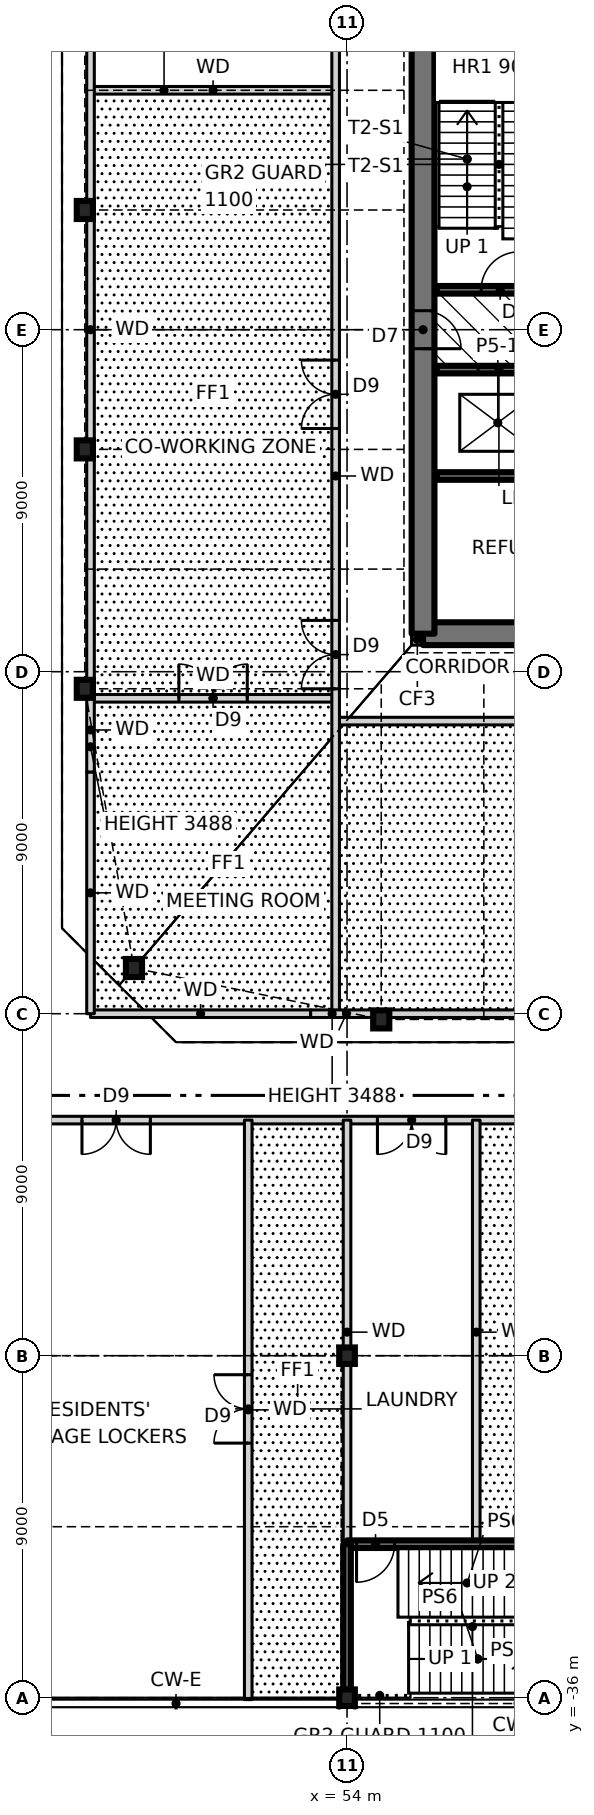
"""IFC4 building model, lengths in metres.
Left out: names, types, materials, properties, quantities, classifications, styles, units other than length and angle.
Written with IfcOpenShell. Run it as: python <this file> out.ifc"""

import sys

from ifc_helpers import new_model, si_unit, direction, frame, frame_2d, origin, origin_2d, place, context, subcontext, project, spatial, rectangle, i_section, extrude, element, fill, save


model = new_model("IFC4")
c1 = context("Model", 3, precision=1e-05, world=origin(), true_north=direction((0.0, 1.0)))
c2 = subcontext(c1, "Body", "Model", "MODEL_VIEW")
j1 = project(units=[si_unit("LENGTHUNIT", "METRE"), si_unit("PLANEANGLEUNIT", "RADIAN")], contexts=[c1])
p1 = place(None, origin())
s1 = spatial("IfcSite", under=j1, at=p1, CompositionType="ELEMENT")
p2 = place(p1, origin())
s2 = spatial("IfcBuilding", under=s1, at=p2, CompositionType="ELEMENT")
p3 = place(p2, frame((0.0, 0.0, 6.0)))
s3 = spatial("IfcBuildingStorey", under=s2, at=p3, CompositionType="ELEMENT", Elevation=6.0)
for number, where, z_axis, x_axis in (
    (1, (48.394, -16.797, 0.0), (0.0, 0.0, 1.0), (1.0, 0.0, 0.0)),
    (2, (54.9, -18.15, 0.0), (0.0, 0.0, 1.0), (1.0, 0.0, 0.0)),
    (3, (47.1, 3.15, 0.0), (0.0, 0.0, 1.0), (1.0, 0.0, 0.0)),
    (4, (47.1, -3.15, 0.0), (0.0, 0.0, 1.0), (1.0, 0.0, 0.0)),
    (5, (47.1, -9.45, 0.0), (0.0, 0.0, 1.0), (1.0, 0.0, 0.0)),
):
    element("IfcColumn", number, at=place(p3, frame(where, z_axis=z_axis, x_axis=x_axis)), inside=s3, PredefinedType="COLUMN", context=c2, shape_type="SweptSolid", body=[
        extrude(i_section(OverallWidth=0.424, OverallDepth=0.475, WebThickness=0.048, FlangeThickness=0.077, at=origin_2d()), origin(), (0.0, 0.0, 1.0), 4.5),
    ])
for number, where, z_axis, x_axis in (
    (6, (54.0, -36.0, 0.0), (0.0, 0.0, 1.0), (1.0, 0.0, 0.0)),
    (7, (54.0, -27.0, 0.0), (0.0, 0.0, 1.0), (1.0, 0.0, 0.0)),
):
    element("IfcColumn", number, at=place(p3, frame(where, z_axis=z_axis, x_axis=x_axis)), inside=s3, PredefinedType="COLUMN", context=c2, shape_type="SweptSolid", body=[
        extrude(i_section(OverallWidth=0.411, OverallDepth=0.434, WebThickness=0.036, FlangeThickness=0.057, at=origin_2d()), origin(), (0.0, 0.0, 1.0), 4.5),
    ])
p4 = place(p3, frame((55.7, -8.15, 0.0), z_axis=(0.0, 0.0, 1.0), x_axis=(1.0, 0.0, 0.0)))
e8 = element("IfcWall", 8, at=p4, inside=s3, PredefinedType="SOLIDWALL", context=c2, shape_type="SweptSolid", body=[
    extrude(rectangle(XDim=0.3, YDim=0.3, at=frame_2d((0.15, 0.0))), origin(), (0.0, 0.0, 1.0), 4.5),
])
p5 = place(p3, frame((56.0, -8.0, 0.0), z_axis=(0.0, 0.0, 1.0), x_axis=(1.0, 0.0, 0.0)))
e9 = element("IfcWall", 9, at=p5, inside=s3, PredefinedType="SHEAR", context=c2, shape_type="SweptSolid", body=[
    extrude(rectangle(XDim=14.0, YDim=0.6, at=frame_2d((7.0, 0.0))), origin(), (0.0, 0.0, 1.0), 4.5),
])
p6 = place(p5, frame((2.7, 0.0, 0.0)))
e10 = element("IfcOpeningElement", 10, at=p6, cuts=e9, PredefinedType="OPENING", context=c2, shape_type="SweptSolid", body=[
    extrude(rectangle(XDim=0.9, YDim=2.1, at=frame_2d((0.45, 1.05))), frame((0.0, 0.31, 0.0), z_axis=(0.0, -1.0, 0.0), x_axis=(1.0, 0.0, 0.0)), (0.0, 0.0, 1.0), 0.62),
])
p7 = place(p5, frame((7.7, 0.0, 0.0)))
e11 = element("IfcOpeningElement", 11, at=p7, cuts=e9, PredefinedType="OPENING", context=c2, shape_type="SweptSolid", body=[
    extrude(rectangle(XDim=0.9, YDim=2.1, at=frame_2d((0.45, 1.05))), frame((0.0, 0.31, 0.0), z_axis=(0.0, -1.0, 0.0), x_axis=(1.0, 0.0, 0.0)), (0.0, 0.0, 1.0), 0.62),
])
p8 = place(p3, frame((56.0, 8.0, 0.0), z_axis=(0.0, 0.0, 1.0), x_axis=(0.0, -1.0, 0.0)))
e12 = element("IfcWall", 12, at=p8, inside=s3, PredefinedType="SHEAR", context=c2, shape_type="SweptSolid", body=[
    extrude(rectangle(XDim=16.0, YDim=0.6, at=frame_2d((8.0, 0.0))), origin(), (0.0, 0.0, 1.0), 4.5),
])
p9 = place(p8, frame((7.5, 0.0, 0.0)))
e13 = element("IfcOpeningElement", 13, at=p9, cuts=e12, PredefinedType="OPENING", context=c2, shape_type="SweptSolid", body=[
    extrude(rectangle(XDim=1.0, YDim=2.1, at=frame_2d((0.5, 1.05))), frame((0.0, 0.31, 0.0), z_axis=(0.0, -1.0, 0.0), x_axis=(1.0, 0.0, 0.0)), (0.0, 0.0, 1.0), 0.62),
])
p10 = place(p3, frame((54.0, -31.96, 0.0), z_axis=(0.0, 0.0, 1.0), x_axis=(1.0, 0.0, 0.0)))
e14 = element("IfcWall", 14, at=p10, inside=s3, PredefinedType="SOLIDWALL", context=c2, shape_type="SweptSolid", body=[
    extrude(rectangle(XDim=9.0, YDim=0.2, at=frame_2d((4.5, 0.0))), origin(), (0.0, 0.0, 1.0), 4.5),
])
p11 = place(p10, frame((0.25, 0.0, 0.0)))
e15 = element("IfcOpeningElement", 15, at=p11, cuts=e14, PredefinedType="OPENING", context=c2, shape_type="SweptSolid", body=[
    extrude(rectangle(XDim=1.0, YDim=2.1, at=frame_2d((0.5, 1.05))), frame((0.0, 0.11, 0.0), z_axis=(0.0, -1.0, 0.0), x_axis=(1.0, 0.0, 0.0)), (0.0, 0.0, 1.0), 0.22),
])
p12 = place(p3, frame((44.45, -20.8, 0.0), z_axis=(0.0, 0.0, 1.0), x_axis=(1.0, 0.0, 0.0)))
e16 = element("IfcWall", 16, at=p12, inside=s3, PredefinedType="SOLIDWALL", context=c2, shape_type="SweptSolid", body=[
    extrude(rectangle(XDim=37.1, YDim=0.2, at=frame_2d((18.55, 0.0))), origin(), (0.0, 0.0, 1.0), 4.25),
])
p13 = place(p12, frame((2.575, 0.0, 0.0)))
e17 = element("IfcOpeningElement", 17, at=p13, cuts=e16, PredefinedType="OPENING", context=c2, shape_type="SweptSolid", body=[
    extrude(rectangle(XDim=1.8, YDim=2.1, at=frame_2d((0.9, 1.05))), frame((0.0, 0.11, 0.0), z_axis=(0.0, -1.0, 0.0), x_axis=(1.0, 0.0, 0.0)), (0.0, 0.0, 1.0), 0.22),
])
p14 = place(p12, frame((24.125, 0.0, 0.0)))
e18 = element("IfcOpeningElement", 18, at=p14, cuts=e16, PredefinedType="OPENING", context=c2, shape_type="SweptSolid", body=[
    extrude(rectangle(XDim=1.8, YDim=2.1, at=frame_2d((0.9, 1.05))), frame((0.0, 0.11, 0.0), z_axis=(0.0, -1.0, 0.0), x_axis=(1.0, 0.0, 0.0)), (0.0, 0.0, 1.0), 0.22),
])
p15 = place(p12, frame((10.35, 0.0, 0.0)))
e19 = element("IfcOpeningElement", 19, at=p15, cuts=e16, PredefinedType="OPENING", context=c2, shape_type="SweptSolid", body=[
    extrude(rectangle(XDim=1.8, YDim=2.1, at=frame_2d((0.9, 1.05))), frame((0.0, 0.11, 0.0), z_axis=(0.0, -1.0, 0.0), x_axis=(1.0, 0.0, 0.0)), (0.0, 0.0, 1.0), 0.22),
])
p16 = place(p3, frame((47.25, -18.0, 0.0), z_axis=(0.0, 0.0, 1.0), x_axis=(1.0, 0.0, 0.0)))
e20 = element("IfcWall", 20, at=p16, inside=s3, PredefinedType="SOLIDWALL", context=c2, shape_type="SweptSolid", body=[
    extrude(rectangle(XDim=5.793, YDim=0.2, at=frame_2d((2.896, 0.0))), origin(), (0.0, 0.0, 1.0), 4.25),
])
p17 = place(p3, frame((53.7, -10.3, 0.0), z_axis=(0.0, 0.0, 1.0), x_axis=(1.0, 0.0, 0.0)))
e21 = element("IfcWall", 21, at=p17, inside=s3, PredefinedType="SOLIDWALL", context=c2, shape_type="SweptSolid", body=[
    extrude(rectangle(XDim=25.05, YDim=0.2, at=frame_2d((12.525, 0.0))), origin(), (0.0, 0.0, 1.0), 4.25),
])
p18 = place(p17, frame((6.6, 0.0, 0.0)))
e22 = element("IfcOpeningElement", 22, at=p18, cuts=e21, PredefinedType="OPENING", context=c2, shape_type="SweptSolid", body=[
    extrude(rectangle(XDim=1.8, YDim=2.1, at=frame_2d((0.9, 1.05))), frame((0.0, 0.11, 0.0), z_axis=(0.0, -1.0, 0.0), x_axis=(1.0, 0.0, 0.0)), (0.0, 0.0, 1.0), 0.22),
])
p19 = place(p17, frame((15.9, 0.0, 0.0)))
e23 = element("IfcOpeningElement", 23, at=p19, cuts=e21, PredefinedType="OPENING", context=c2, shape_type="SweptSolid", body=[
    extrude(rectangle(XDim=1.8, YDim=2.1, at=frame_2d((0.9, 1.05))), frame((0.0, 0.11, 0.0), z_axis=(0.0, -1.0, 0.0), x_axis=(1.0, 0.0, 0.0)), (0.0, 0.0, 1.0), 0.22),
])
p20 = place(p3, frame((47.25, -9.7, 0.0), z_axis=(0.0, 0.0, 1.0), x_axis=(1.0, 0.0, 0.0)))
e24 = element("IfcWall", 24, at=p20, inside=s3, PredefinedType="SOLIDWALL", context=c2, shape_type="SweptSolid", body=[
    extrude(rectangle(XDim=6.45, YDim=0.2, at=frame_2d((3.225, 0.0))), origin(), (0.0, 0.0, 1.0), 4.25),
])
p21 = place(p20, frame((2.325, 0.0, 0.0)))
e25 = element("IfcOpeningElement", 25, at=p21, cuts=e24, PredefinedType="OPENING", context=c2, shape_type="SweptSolid", body=[
    extrude(rectangle(XDim=1.8, YDim=2.1, at=frame_2d((0.9, 1.05))), frame((0.0, 0.11, 0.0), z_axis=(0.0, -1.0, 0.0), x_axis=(1.0, 0.0, 0.0)), (0.0, 0.0, 1.0), 0.22),
])
p22 = place(p3, frame((56.36, -3.85, 0.0), z_axis=(0.0, 0.0, 1.0), x_axis=(1.0, 0.0, 0.0)))
e26 = element("IfcWall", 26, at=p22, inside=s3, PredefinedType="SOLIDWALL", context=c2, shape_type="SweptSolid", body=[
    extrude(rectangle(XDim=9.94, YDim=0.2, at=frame_2d((4.97, 0.0))), origin(), (0.0, 0.0, 1.0), 4.5),
])
p23 = place(p3, frame((56.36, -1.05, 0.0), z_axis=(0.0, 0.0, 1.0), x_axis=(1.0, 0.0, 0.0)))
e27 = element("IfcWall", 27, at=p23, inside=s3, PredefinedType="SOLIDWALL", context=c2, shape_type="SweptSolid", body=[
    extrude(rectangle(XDim=13.28, YDim=0.2, at=frame_2d((6.64, 0.0))), origin(), (0.0, 0.0, 1.0), 4.5),
])
p24 = place(p23, frame((11.11, 0.0, 0.0)))
e28 = element("IfcOpeningElement", 28, at=p24, cuts=e27, PredefinedType="OPENING", context=c2, shape_type="SweptSolid", body=[
    extrude(rectangle(XDim=1.0, YDim=2.1, at=frame_2d((0.5, 1.05))), frame((0.0, 0.11, 0.0), z_axis=(0.0, -1.0, 0.0), x_axis=(1.0, 0.0, 0.0)), (0.0, 0.0, 1.0), 0.22),
])
p25 = place(p23, frame((1.087, 0.0, 0.0)))
e29 = element("IfcOpeningElement", 29, at=p25, cuts=e27, PredefinedType="OPENING", context=c2, shape_type="SweptSolid", body=[
    extrude(rectangle(XDim=1.1, YDim=2.1, at=frame_2d((0.55, 1.05))), frame((0.0, 0.11, 0.0), z_axis=(0.0, -1.0, 0.0), x_axis=(1.0, 0.0, 0.0)), (0.0, 0.0, 1.0), 0.22),
])
p26 = place(p23, frame((4.39, 0.0, 0.0)))
e30 = element("IfcOpeningElement", 30, at=p26, cuts=e27, PredefinedType="OPENING", context=c2, shape_type="SweptSolid", body=[
    extrude(rectangle(XDim=1.1, YDim=2.1, at=frame_2d((0.55, 1.05))), frame((0.0, 0.11, 0.0), z_axis=(0.0, -1.0, 0.0), x_axis=(1.0, 0.0, 0.0)), (0.0, 0.0, 1.0), 0.22),
])
p27 = place(p23, frame((7.724, 0.0, 0.0)))
e31 = element("IfcOpeningElement", 31, at=p27, cuts=e27, PredefinedType="OPENING", context=c2, shape_type="SweptSolid", body=[
    extrude(rectangle(XDim=1.1, YDim=2.1, at=frame_2d((0.55, 1.05))), frame((0.0, 0.11, 0.0), z_axis=(0.0, -1.0, 0.0), x_axis=(1.0, 0.0, 0.0)), (0.0, 0.0, 1.0), 0.22),
])
p28 = place(p3, frame((56.36, 1.05, 0.0), z_axis=(0.0, 0.0, 1.0), x_axis=(1.0, 0.0, 0.0)))
e32 = element("IfcWall", 32, at=p28, inside=s3, PredefinedType="SOLIDWALL", context=c2, shape_type="SweptSolid", body=[
    extrude(rectangle(XDim=13.28, YDim=0.2, at=frame_2d((6.64, 0.0))), origin(), (0.0, 0.0, 1.0), 4.5),
])
p29 = place(p28, frame((1.17, 0.0, 0.0)))
e33 = element("IfcOpeningElement", 33, at=p29, cuts=e32, PredefinedType="OPENING", context=c2, shape_type="SweptSolid", body=[
    extrude(rectangle(XDim=1.0, YDim=2.1, at=frame_2d((0.5, 1.05))), frame((0.0, 0.11, 0.0), z_axis=(0.0, -1.0, 0.0), x_axis=(1.0, 0.0, 0.0)), (0.0, 0.0, 1.0), 0.22),
])
p30 = place(p28, frame((7.24, 0.0, 0.0)))
e34 = element("IfcOpeningElement", 34, at=p30, cuts=e32, PredefinedType="OPENING", context=c2, shape_type="SweptSolid", body=[
    extrude(rectangle(XDim=0.9, YDim=2.1, at=frame_2d((0.45, 1.05))), frame((0.0, 0.11, 0.0), z_axis=(0.0, -1.0, 0.0), x_axis=(1.0, 0.0, 0.0)), (0.0, 0.0, 1.0), 0.22),
])
p31 = place(p28, frame((3.94, 0.0, 0.0)))
e35 = element("IfcOpeningElement", 35, at=p31, cuts=e32, PredefinedType="OPENING", context=c2, shape_type="SweptSolid", body=[
    extrude(rectangle(XDim=0.9, YDim=2.1, at=frame_2d((0.45, 1.05))), frame((0.0, 0.11, 0.0), z_axis=(0.0, -1.0, 0.0), x_axis=(1.0, 0.0, 0.0)), (0.0, 0.0, 1.0), 0.22),
])
p32 = place(p28, frame((10.96, 0.0, 0.0)))
e36 = element("IfcOpeningElement", 36, at=p32, cuts=e32, PredefinedType="OPENING", context=c2, shape_type="SweptSolid", body=[
    extrude(rectangle(XDim=1.3, YDim=2.1, at=frame_2d((0.65, 1.05))), frame((0.0, 0.11, 0.0), z_axis=(0.0, -1.0, 0.0), x_axis=(1.0, 0.0, 0.0)), (0.0, 0.0, 1.0), 0.22),
])
p33 = place(p3, frame((47.25, 6.3, 0.0), z_axis=(0.0, 0.0, 1.0), x_axis=(1.0, 0.0, 0.0)))
e37 = element("IfcWall", 37, at=p33, inside=s3, PredefinedType="SOLIDWALL", context=c2, shape_type="SweptSolid", body=[
    extrude(rectangle(XDim=6.45, YDim=0.2, at=frame_2d((3.225, 0.0))), origin(), (0.0, 0.0, 1.0), 3.643),
])
p34 = place(p3, frame((57.4, -31.96, 0.0), z_axis=(0.0, 0.0, 1.0), x_axis=(0.0, 1.0, 0.0)))
e38 = element("IfcWall", 38, at=p34, inside=s3, PredefinedType="SOLIDWALL", context=c2, shape_type="SweptSolid", body=[
    extrude(rectangle(XDim=11.16, YDim=0.2, at=frame_2d((5.58, 0.0))), origin(), (0.0, 0.0, 1.0), 4.25),
])
p35 = place(p3, frame((54.0, -35.783, 0.0), z_axis=(0.0, 0.0, 1.0), x_axis=(0.0, 1.0, 0.0)))
e39 = element("IfcWall", 39, at=p35, inside=s3, PredefinedType="SOLIDWALL", context=c2, shape_type="SweptSolid", body=[
    extrude(rectangle(XDim=3.823, YDim=0.2, at=frame_2d((1.911, 0.0))), origin(), (0.0, 0.0, 1.0), 4.5),
])
p36 = place(p3, frame((54.0, -31.96, 0.0), z_axis=(0.0, 0.0, 1.0), x_axis=(0.0, 1.0, 0.0)))
e40 = element("IfcWall", 40, at=p36, inside=s3, PredefinedType="SOLIDWALL", context=c2, shape_type="SweptSolid", body=[
    extrude(rectangle(XDim=11.16, YDim=0.2, at=frame_2d((5.58, 0.0))), origin(), (0.0, 0.0, 1.0), 4.25),
])
p37 = place(p3, frame((53.7, -18.0, 0.0), z_axis=(0.0, 0.0, 1.0), x_axis=(0.0, 1.0, 0.0)))
e41 = element("IfcWall", 41, at=p37, inside=s3, PredefinedType="SOLIDWALL", context=c2, shape_type="SweptSolid", body=[
    extrude(rectangle(XDim=28.3, YDim=0.2, at=frame_2d((14.15, 0.0))), origin(), (0.0, 0.0, 1.0), 4.25),
])
p38 = place(p37, frame((15.4, 0.0, 0.0)))
e42 = element("IfcOpeningElement", 42, at=p38, cuts=e41, PredefinedType="OPENING", context=c2, shape_type="SweptSolid", body=[
    extrude(rectangle(XDim=1.8, YDim=2.1, at=frame_2d((0.9, 1.05))), frame((0.0, 0.11, 0.0), z_axis=(0.0, -1.0, 0.0), x_axis=(1.0, 0.0, 0.0)), (0.0, 0.0, 1.0), 0.22),
])
p39 = place(p37, frame((25.4, 0.0, 0.0)))
e43 = element("IfcOpeningElement", 43, at=p39, cuts=e41, PredefinedType="OPENING", context=c2, shape_type="SweptSolid", body=[
    extrude(rectangle(XDim=1.8, YDim=2.1, at=frame_2d((0.9, 1.05))), frame((0.0, 0.11, 0.0), z_axis=(0.0, -1.0, 0.0), x_axis=(1.0, 0.0, 0.0)), (0.0, 0.0, 1.0), 0.22),
])
p40 = place(p37, frame((8.55, 0.0, 0.0)))
e44 = element("IfcOpeningElement", 44, at=p40, cuts=e41, PredefinedType="OPENING", context=c2, shape_type="SweptSolid", body=[
    extrude(rectangle(XDim=1.8, YDim=2.1, at=frame_2d((0.9, 1.05))), frame((0.0, 0.11, 0.0), z_axis=(0.0, -1.0, 0.0), x_axis=(1.0, 0.0, 0.0)), (0.0, 0.0, 1.0), 0.22),
])
p41 = place(p3, frame((51.4, -36.05, 0.0), z_axis=(0.0, 0.0, 1.0), x_axis=(0.0, 1.0, 0.0)))
e45 = element("IfcWall", 45, at=p41, inside=s3, PredefinedType="SOLIDWALL", context=c2, shape_type="SweptSolid", body=[
    extrude(rectangle(XDim=15.25, YDim=0.2, at=frame_2d((7.625, 0.0))), origin(), (0.0, 0.0, 1.0), 4.25),
])
p42 = place(p41, frame((6.75, 0.0, 0.0)))
e46 = element("IfcOpeningElement", 46, at=p42, cuts=e45, PredefinedType="OPENING", context=c2, shape_type="SweptSolid", body=[
    extrude(rectangle(XDim=1.8, YDim=2.1, at=frame_2d((0.9, 1.05))), frame((0.0, 0.11, 0.0), z_axis=(0.0, -1.0, 0.0), x_axis=(1.0, 0.0, 0.0)), (0.0, 0.0, 1.0), 0.22),
])
p43 = place(p3, frame((47.25, -18.0, 0.0), z_axis=(0.0, 0.0, 1.0), x_axis=(0.0, 1.0, 0.0)))
e47 = element("IfcWall", 47, at=p43, inside=s3, PredefinedType="SOLIDWALL", context=c2, shape_type="SweptSolid", body=[
    extrude(rectangle(XDim=6.361, YDim=0.2, at=frame_2d((3.181, 0.0))), origin(), (0.0, 0.0, 1.0), 4.25),
])
p44 = place(p3, frame((53.043, -18.0, 0.0), z_axis=(0.0, 0.0, 1.0), x_axis=(1.0, 0.0, 0.0)))
e48 = element("IfcWall", 48, at=p44, inside=s3, PredefinedType="SOLIDWALL", context=c2, shape_type="SweptSolid", body=[
    extrude(rectangle(XDim=1.884, YDim=0.2, at=frame_2d((0.942, 0.0))), origin(), (0.0, 0.0, 1.0), 3.488),
])
p45 = place(p3, frame((54.927, -18.0, 0.0), z_axis=(0.0, 0.0, 1.0), x_axis=(1.0, 0.0, 0.0)))
e49 = element("IfcWall", 49, at=p45, inside=s3, PredefinedType="SOLIDWALL", context=c2, shape_type="SweptSolid", body=[
    extrude(rectangle(XDim=16.146, YDim=0.2, at=frame_2d((8.073, 0.0))), origin(), (0.0, 0.0, 1.0), 4.25),
])
p46 = place(p3, frame((47.25, -11.639, 0.0), z_axis=(0.0, 0.0, 1.0), x_axis=(0.0, 1.0, 0.0)))
e50 = element("IfcWall", 50, at=p46, inside=s3, PredefinedType="SOLIDWALL", context=c2, shape_type="SweptSolid", body=[
    extrude(rectangle(XDim=2.212, YDim=0.2, at=frame_2d((1.106, 0.0))), origin(), (0.0, 0.0, 1.0), 3.488),
])
p47 = place(p3, frame((47.25, -9.427, 0.0), z_axis=(0.0, 0.0, 1.0), x_axis=(0.0, 1.0, 0.0)))
e51 = element("IfcWall", 51, at=p47, inside=s3, PredefinedType="SOLIDWALL", context=c2, shape_type="SweptSolid", body=[
    extrude(rectangle(XDim=18.854, YDim=0.2, at=frame_2d((9.427, 0.0))), origin(), (0.0, 0.0, 1.0), 4.25),
])
p48 = place(p29, origin())
e52 = element("IfcDoor", 52, at=p48, inside=s3, OperationType="SINGLE_SWING_RIGHT", PredefinedType="DOOR", context=c2, shape_type="SweptSolid", body=[
    extrude(rectangle(XDim=1.0, YDim=2.1, at=frame_2d((0.5, 1.05))), frame((0.0, 0.025, 0.0), z_axis=(0.0, -1.0, 0.0), x_axis=(1.0, 0.0, 0.0)), (0.0, 0.0, 1.0), 0.05),
])
fill(e33, e52)
p49 = place(p38, origin())
e53 = element("IfcDoor", 53, at=p49, inside=s3, OperationType="DOUBLE_DOOR_SINGLE_SWING", PredefinedType="DOOR", context=c2, shape_type="SweptSolid", body=[
    extrude(rectangle(XDim=1.8, YDim=2.1, at=frame_2d((0.9, 1.05))), frame((0.0, 0.025, 0.0), z_axis=(0.0, -1.0, 0.0), x_axis=(1.0, 0.0, 0.0)), (0.0, 0.0, 1.0), 0.05),
])
fill(e42, e53)
p50 = place(p40, origin())
e54 = element("IfcDoor", 54, at=p50, inside=s3, OperationType="DOUBLE_DOOR_SINGLE_SWING", PredefinedType="DOOR", context=c2, shape_type="SweptSolid", body=[
    extrude(rectangle(XDim=1.8, YDim=2.1, at=frame_2d((0.9, 1.05))), frame((0.0, 0.025, 0.0), z_axis=(0.0, -1.0, 0.0), x_axis=(1.0, 0.0, 0.0)), (0.0, 0.0, 1.0), 0.05),
])
fill(e44, e54)
p51 = place(p21, origin())
e55 = element("IfcDoor", 55, at=p51, inside=s3, OperationType="DOUBLE_DOOR_SINGLE_SWING", PredefinedType="DOOR", context=c2, shape_type="SweptSolid", body=[
    extrude(rectangle(XDim=1.8, YDim=2.1, at=frame_2d((0.9, 1.05))), frame((0.0, 0.025, 0.0), z_axis=(0.0, -1.0, 0.0), x_axis=(1.0, 0.0, 0.0)), (0.0, 0.0, 1.0), 0.05),
])
fill(e25, e55)
p52 = place(p13, frame((1.8, 0.0, 0.0), z_axis=(0.0, 0.0, 1.0), x_axis=(-1.0, 0.0, 0.0)))
e56 = element("IfcDoor", 56, at=p52, inside=s3, OperationType="DOUBLE_DOOR_SINGLE_SWING", PredefinedType="DOOR", context=c2, shape_type="SweptSolid", body=[
    extrude(rectangle(XDim=1.8, YDim=2.1, at=frame_2d((0.9, 1.05))), frame((0.0, 0.025, 0.0), z_axis=(0.0, -1.0, 0.0), x_axis=(1.0, 0.0, 0.0)), (0.0, 0.0, 1.0), 0.05),
])
fill(e17, e56)
p53 = place(p42, origin())
e57 = element("IfcDoor", 57, at=p53, inside=s3, OperationType="DOUBLE_DOOR_SINGLE_SWING", PredefinedType="DOOR", context=c2, shape_type="SweptSolid", body=[
    extrude(rectangle(XDim=1.8, YDim=2.1, at=frame_2d((0.9, 1.05))), frame((0.0, 0.025, 0.0), z_axis=(0.0, -1.0, 0.0), x_axis=(1.0, 0.0, 0.0)), (0.0, 0.0, 1.0), 0.05),
])
fill(e46, e57)
p54 = place(p15, frame((1.8, 0.0, 0.0), z_axis=(0.0, 0.0, 1.0), x_axis=(-1.0, 0.0, 0.0)))
e58 = element("IfcDoor", 58, at=p54, inside=s3, OperationType="DOUBLE_DOOR_SINGLE_SWING", PredefinedType="DOOR", context=c2, shape_type="SweptSolid", body=[
    extrude(rectangle(XDim=1.8, YDim=2.1, at=frame_2d((0.9, 1.05))), frame((0.0, 0.025, 0.0), z_axis=(0.0, -1.0, 0.0), x_axis=(1.0, 0.0, 0.0)), (0.0, 0.0, 1.0), 0.05),
])
fill(e19, e58)
p55 = place(p11, frame((1.0, 0.0, 0.0), z_axis=(0.0, 0.0, 1.0), x_axis=(-1.0, 0.0, 0.0)))
e59 = element("IfcDoor", 59, at=p55, inside=s3, OperationType="SINGLE_SWING_RIGHT", PredefinedType="DOOR", context=c2, shape_type="SweptSolid", body=[
    extrude(rectangle(XDim=1.0, YDim=2.1, at=frame_2d((0.5, 1.05))), frame((0.0, 0.025, 0.0), z_axis=(0.0, -1.0, 0.0), x_axis=(1.0, 0.0, 0.0)), (0.0, 0.0, 1.0), 0.05),
])
fill(e15, e59)
p56 = place(p9, origin())
e60 = element("IfcDoor", 60, at=p56, inside=s3, OperationType="SINGLE_SWING_RIGHT", PredefinedType="DOOR", context=c2, shape_type="SweptSolid", body=[
    extrude(rectangle(XDim=1.0, YDim=2.1, at=frame_2d((0.5, 1.05))), frame((0.0, 0.025, 0.0), z_axis=(0.0, -1.0, 0.0), x_axis=(1.0, 0.0, 0.0)), (0.0, 0.0, 1.0), 0.05),
])
fill(e13, e60)
p57 = place(p25, origin())
e61 = element("IfcDoor", 61, at=p57, inside=s3, OperationType="DOUBLE_DOOR_SLIDING", PredefinedType="DOOR", context=c2, shape_type="SweptSolid", body=[
    extrude(rectangle(XDim=1.1, YDim=2.1, at=frame_2d((0.55, 1.05))), frame((0.0, 0.025, 0.0), z_axis=(0.0, -1.0, 0.0), x_axis=(1.0, 0.0, 0.0)), (0.0, 0.0, 1.0), 0.05),
])
fill(e29, e61)
save(model, sys.argv[1])
